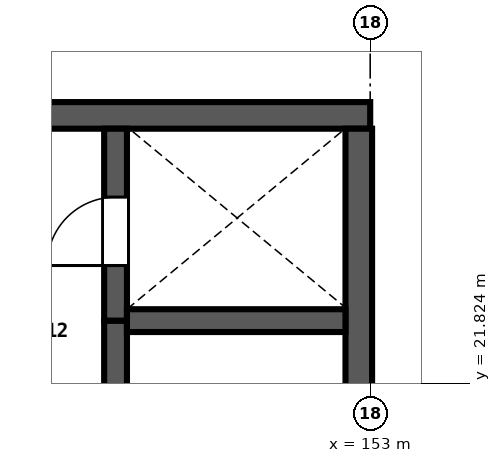
"""IFC4 building model, lengths in metres.
Left out: names, types, materials, properties, quantities, classifications, styles, units other than length and angle.
Written with IfcOpenShell. Run it as: python <this file> out.ifc"""

import sys

from ifc_helpers import new_model, si_unit, direction, frame, frame_2d, origin, place, context, subcontext, project, spatial, rectangle, extrude, element, fill, save


model = new_model("IFC4")
c1 = context("Model", 3, precision=1e-05, world=origin(), true_north=direction((0.0, 1.0)))
c2 = subcontext(c1, "Body", "Model", "MODEL_VIEW")
j1 = project(units=[si_unit("LENGTHUNIT", "METRE"), si_unit("PLANEANGLEUNIT", "RADIAN")], contexts=[c1])
p1 = place(None, origin())
s1 = spatial("IfcSite", under=j1, at=p1, CompositionType="ELEMENT")
p2 = place(p1, origin())
s2 = spatial("IfcBuilding", under=s1, at=p2, CompositionType="ELEMENT")
p3 = place(p2, frame((0.0, 0.0, 9.6)))
s3 = spatial("IfcBuildingStorey", under=s2, at=p3, CompositionType="ELEMENT", Elevation=9.6)
p4 = place(p3, frame((153.0, 25.35, 0.0), z_axis=(0.0, 0.0, 1.0), x_axis=(-1.0, 0.0, 0.0)))
e1 = element("IfcWall", 1, at=p4, inside=s3, PredefinedType="SHEAR", context=c2, shape_type="SweptSolid", body=[
    extrude(rectangle(XDim=18.0, YDim=0.35, at=frame_2d((9.0, 0.0))), origin(), (0.0, 0.0, 1.0), 4.5),
])
p5 = place(p3, frame((152.85, 19.825, 0.0), z_axis=(0.0, 0.0, 1.0), x_axis=(0.0, 1.0, 0.0)))
e2 = element("IfcWall", 2, at=p5, inside=s3, PredefinedType="SHEAR", context=c2, shape_type="SweptSolid", body=[
    extrude(rectangle(XDim=5.35, YDim=0.35, at=frame_2d((2.675, 0.0))), origin(), (0.0, 0.0, 1.0), 4.5),
])
p6 = place(p3, frame((149.65, 19.825, 0.0), z_axis=(0.0, 0.0, 1.0), x_axis=(0.0, 1.0, 0.0)))
e3 = element("IfcWall", 3, at=p6, inside=s3, PredefinedType="SHEAR", context=c2, shape_type="SweptSolid", body=[
    extrude(rectangle(XDim=2.825, YDim=0.3, at=frame_2d((1.413, 0.0))), origin(), (0.0, 0.0, 1.0), 4.5),
])
p7 = place(p3, frame((149.65, 22.65, 0.0), z_axis=(0.0, 0.0, 1.0), x_axis=(0.0, 1.0, 0.0)))
e4 = element("IfcWall", 4, at=p7, inside=s3, PredefinedType="SHEAR", context=c2, shape_type="SweptSolid", body=[
    extrude(rectangle(XDim=2.525, YDim=0.3, at=frame_2d((1.263, 0.0))), origin(), (0.0, 0.0, 1.0), 4.5),
])
p8 = place(p7, frame((0.725, 0.0, 0.0)))
e5 = element("IfcOpeningElement", 5, at=p8, cuts=e4, PredefinedType="OPENING", context=c2, shape_type="SweptSolid", body=[
    extrude(rectangle(XDim=0.9, YDim=2.1, at=frame_2d((0.45, 1.05))), frame((0.0, 0.16, 0.0), z_axis=(0.0, -1.0, 0.0), x_axis=(1.0, 0.0, 0.0)), (0.0, 0.0, 1.0), 0.32),
])
p9 = place(p3, frame((149.8, 22.65, 0.0), z_axis=(0.0, 0.0, 1.0), x_axis=(1.0, 0.0, 0.0)))
e6 = element("IfcWall", 6, at=p9, inside=s3, PredefinedType="SHEAR", context=c2, shape_type="SweptSolid", body=[
    extrude(rectangle(XDim=2.875, YDim=0.3, at=frame_2d((1.438, 0.0))), origin(), (0.0, 0.0, 1.0), 4.5),
])
p10 = place(p8, origin())
e7 = element("IfcDoor", 7, at=p10, inside=s3, OperationType="SINGLE_SWING_LEFT", PredefinedType="DOOR", context=c2, shape_type="SweptSolid", body=[
    extrude(rectangle(XDim=0.9, YDim=2.1, at=frame_2d((0.45, 1.05))), frame((0.0, 0.025, 0.0), z_axis=(0.0, -1.0, 0.0), x_axis=(1.0, 0.0, 0.0)), (0.0, 0.0, 1.0), 0.05),
])
fill(e5, e7)
save(model, sys.argv[1])
